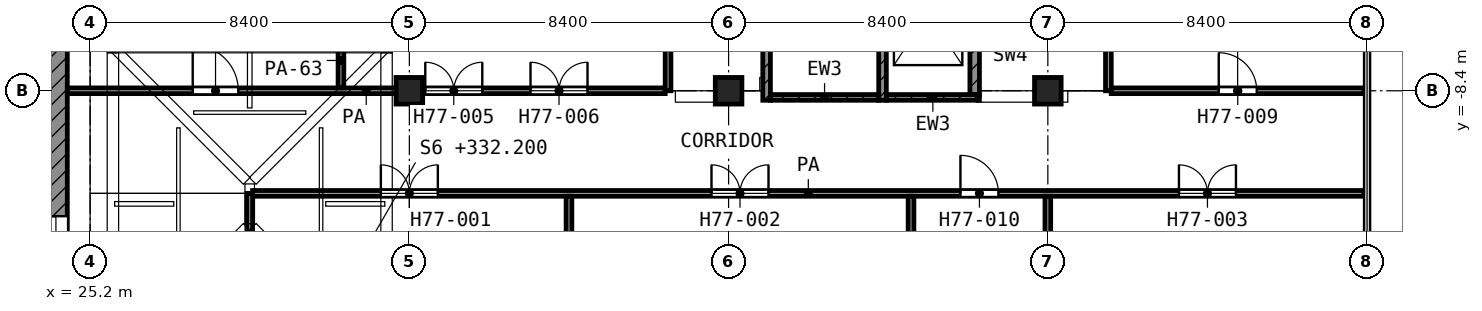
"""IFC4 building model, lengths in metres.
Left out: names, types, materials, properties, quantities, classifications, styles, units other than length and angle.
Written with IfcOpenShell. Run it as: python <this file> out.ifc"""

import sys

from ifc_helpers import new_model, si_unit, direction, frame, frame_2d, origin, origin_2d, place, context, subcontext, project, spatial, rectangle, extrude, element, fill, save


model = new_model("IFC4")
c1 = context("Model", 3, precision=1e-05, world=origin(), true_north=direction((0.0, 1.0)))
c2 = subcontext(c1, "Body", "Model", "MODEL_VIEW")
j1 = project(units=[si_unit("LENGTHUNIT", "METRE"), si_unit("PLANEANGLEUNIT", "RADIAN")], contexts=[c1])
p1 = place(None, origin())
s1 = spatial("IfcSite", under=j1, at=p1, CompositionType="ELEMENT")
p2 = place(p1, origin())
s2 = spatial("IfcBuilding", under=s1, at=p2, CompositionType="ELEMENT")
p3 = place(p2, frame((0.0, 0.0, 332.2)))
s3 = spatial("IfcBuildingStorey", under=s2, at=p3, CompositionType="ELEMENT", Elevation=332.2)
for number, where, z_axis, x_axis in (
    (1, (33.6, -8.4, 0.0), (0.0, 0.0, 1.0), (1.0, 0.0, 0.0)),
    (2, (42.0, -8.4, 0.0), (0.0, 0.0, 1.0), (1.0, 0.0, 0.0)),
    (3, (50.4, -8.4, 0.0), (0.0, 0.0, 1.0), (1.0, 0.0, 0.0)),
):
    element("IfcColumn", number, at=place(p3, frame(where, z_axis=z_axis, x_axis=x_axis)), inside=s3, PredefinedType="COLUMN", context=c2, shape_type="SweptSolid", body=[
        extrude(rectangle(XDim=0.7, YDim=0.7, at=origin_2d()), origin(), (0.0, 0.0, 1.0), 4.5),
    ])
p4 = place(p3, frame((24.3, -24.0, 0.0), z_axis=(0.0, 0.0, 1.0), x_axis=(0.0, 1.0, 0.0)))
e4 = element("IfcWall", 4, at=p4, inside=s3, PredefinedType="SHEAR", context=c2, shape_type="SweptSolid", body=[
    extrude(rectangle(XDim=18.6, YDim=0.6, at=frame_2d((9.3, 0.0))), origin(), (0.0, 0.0, 1.0), 3.95),
])
p5 = place(p4, frame((10.5, 0.0, 0.0)))
e5 = element("IfcOpeningElement", 5, at=p5, cuts=e4, PredefinedType="OPENING", context=c2, shape_type="SweptSolid", body=[
    extrude(rectangle(XDim=1.8, YDim=2.1, at=frame_2d((0.9, 1.05))), frame((0.0, 0.31, 0.0), z_axis=(0.0, -1.0, 0.0), x_axis=(1.0, 0.0, 0.0)), (0.0, 0.0, 1.0), 0.62),
])
p6 = place(p3, frame((43.0, -8.65, 0.0), z_axis=(0.0, 0.0, 1.0), x_axis=(0.0, 1.0, 0.0)))
e6 = element("IfcWall", 6, at=p6, inside=s3, PredefinedType="SHEAR", context=c2, shape_type="SweptSolid", body=[
    extrude(rectangle(XDim=8.35, YDim=0.2, at=frame_2d((4.175, 0.0))), origin(), (0.0, 0.0, 1.0), 3.95),
])
p7 = place(p6, frame((7.0, 0.0, 0.0)))
e7 = element("IfcOpeningElement", 7, at=p7, cuts=e6, PredefinedType="OPENING", context=c2, shape_type="SweptSolid", body=[
    extrude(rectangle(XDim=1.1, YDim=2.1, at=frame_2d((0.55, 1.05))), frame((0.0, 0.11, 0.0), z_axis=(0.0, -1.0, 0.0), x_axis=(1.0, 0.0, 0.0)), (0.0, 0.0, 1.0), 0.22),
])
p8 = place(p3, frame((46.05, -8.65, 0.0), z_axis=(0.0, 0.0, 1.0), x_axis=(0.0, 1.0, 0.0)))
e8 = element("IfcWall", 8, at=p8, inside=s3, PredefinedType="SHEAR", context=c2, shape_type="SweptSolid", body=[
    extrude(rectangle(XDim=8.35, YDim=0.2, at=frame_2d((4.175, 0.0))), origin(), (0.0, 0.0, 1.0), 3.95),
])
p9 = place(p8, frame((7.0, 0.0, 0.0)))
e9 = element("IfcOpeningElement", 9, at=p9, cuts=e8, PredefinedType="OPENING", context=c2, shape_type="SweptSolid", body=[
    extrude(rectangle(XDim=1.1, YDim=2.1, at=frame_2d((0.55, 1.05))), frame((0.0, 0.11, 0.0), z_axis=(0.0, -1.0, 0.0), x_axis=(1.0, 0.0, 0.0)), (0.0, 0.0, 1.0), 0.22),
])
p10 = place(p3, frame((43.1, -8.575, 0.0), z_axis=(0.0, 0.0, 1.0), x_axis=(1.0, 0.0, 0.0)))
e10 = element("IfcWall", 10, at=p10, inside=s3, PredefinedType="SHEAR", context=c2, shape_type="SweptSolid", body=[
    extrude(rectangle(XDim=2.85, YDim=0.15, at=frame_2d((1.425, 0.0))), origin(), (0.0, 0.0, 1.0), 3.95),
])
p11 = place(p3, frame((46.15, -8.575, 0.0), z_axis=(0.0, 0.0, 1.0), x_axis=(1.0, 0.0, 0.0)))
e11 = element("IfcWall", 11, at=p11, inside=s3, PredefinedType="SHEAR", context=c2, shape_type="SweptSolid", body=[
    extrude(rectangle(XDim=2.45, YDim=0.15, at=frame_2d((1.225, 0.0))), origin(), (0.0, 0.0, 1.0), 3.95),
])
p12 = place(p3, frame((48.475, -8.5, 0.0), z_axis=(0.0, 0.0, 1.0), x_axis=(0.0, 1.0, 0.0)))
e12 = element("IfcWall", 12, at=p12, inside=s3, PredefinedType="SHEAR", context=c2, shape_type="SweptSolid", body=[
    extrude(rectangle(XDim=3.475, YDim=0.25, at=frame_2d((1.738, 0.0))), origin(), (0.0, 0.0, 1.0), 3.95),
])
p13 = place(p3, frame((29.475, -11.1, 0.0), z_axis=(0.0, 0.0, 1.0), x_axis=(1.0, 0.0, 0.0)))
e13 = element("IfcWall", 13, at=p13, inside=s3, PredefinedType="PARTITIONING", context=c2, shape_type="SweptSolid", body=[
    extrude(rectangle(XDim=29.245, YDim=0.15, at=frame_2d((14.623, 0.0))), origin(), (0.0, 0.0, 1.0), 3.95),
])
p14 = place(p13, frame((3.375, 0.0, 0.0)))
e14 = element("IfcOpeningElement", 14, at=p14, cuts=e13, PredefinedType="OPENING", context=c2, shape_type="SweptSolid", body=[
    extrude(rectangle(XDim=1.5, YDim=2.1, at=frame_2d((0.75, 1.05))), frame((0.0, 0.085, 0.0), z_axis=(0.0, -1.0, 0.0), x_axis=(1.0, 0.0, 0.0)), (0.0, 0.0, 1.0), 0.17),
])
p15 = place(p13, frame((12.075, 0.0, 0.0)))
e15 = element("IfcOpeningElement", 15, at=p15, cuts=e13, PredefinedType="OPENING", context=c2, shape_type="SweptSolid", body=[
    extrude(rectangle(XDim=1.5, YDim=2.1, at=frame_2d((0.75, 1.05))), frame((0.0, 0.085, 0.0), z_axis=(0.0, -1.0, 0.0), x_axis=(1.0, 0.0, 0.0)), (0.0, 0.0, 1.0), 0.17),
])
p16 = place(p13, frame((18.625, 0.0, 0.0)))
e16 = element("IfcOpeningElement", 16, at=p16, cuts=e13, PredefinedType="OPENING", context=c2, shape_type="SweptSolid", body=[
    extrude(rectangle(XDim=1.0, YDim=2.1, at=frame_2d((0.5, 1.05))), frame((0.0, 0.085, 0.0), z_axis=(0.0, -1.0, 0.0), x_axis=(1.0, 0.0, 0.0)), (0.0, 0.0, 1.0), 0.17),
])
p17 = place(p13, frame((24.375, 0.0, 0.0)))
e17 = element("IfcOpeningElement", 17, at=p17, cuts=e13, PredefinedType="OPENING", context=c2, shape_type="SweptSolid", body=[
    extrude(rectangle(XDim=1.5, YDim=2.1, at=frame_2d((0.75, 1.05))), frame((0.0, 0.085, 0.0), z_axis=(0.0, -1.0, 0.0), x_axis=(1.0, 0.0, 0.0)), (0.0, 0.0, 1.0), 0.17),
])
p18 = place(p3, frame((24.6, -8.4, 0.0), z_axis=(0.0, 0.0, 1.0), x_axis=(1.0, 0.0, 0.0)))
e18 = element("IfcWall", 18, at=p18, inside=s3, PredefinedType="PARTITIONING", context=c2, shape_type="SweptSolid", body=[
    extrude(rectangle(XDim=15.732, YDim=0.15, at=frame_2d((7.866, 0.0))), origin(), (0.0, 0.0, 1.0), 3.95),
])
p19 = place(p18, frame((3.3, 0.0, 0.0)))
e19 = element("IfcOpeningElement", 19, at=p19, cuts=e18, PredefinedType="OPENING", context=c2, shape_type="SweptSolid", body=[
    extrude(rectangle(XDim=1.2, YDim=2.1, at=frame_2d((0.6, 1.05))), frame((0.0, 0.085, 0.0), z_axis=(0.0, -1.0, 0.0), x_axis=(1.0, 0.0, 0.0)), (0.0, 0.0, 1.0), 0.17),
])
p20 = place(p18, frame((9.419, 0.0, 0.0)))
e20 = element("IfcOpeningElement", 20, at=p20, cuts=e18, PredefinedType="OPENING", context=c2, shape_type="SweptSolid", body=[
    extrude(rectangle(XDim=1.5, YDim=2.1, at=frame_2d((0.75, 1.05))), frame((0.0, 0.085, 0.0), z_axis=(0.0, -1.0, 0.0), x_axis=(1.0, 0.0, 0.0)), (0.0, 0.0, 1.0), 0.17),
])
p21 = place(p18, frame((12.188, 0.0, 0.0)))
e21 = element("IfcOpeningElement", 21, at=p21, cuts=e18, PredefinedType="OPENING", context=c2, shape_type="SweptSolid", body=[
    extrude(rectangle(XDim=1.5, YDim=2.1, at=frame_2d((0.75, 1.05))), frame((0.0, 0.085, 0.0), z_axis=(0.0, -1.0, 0.0), x_axis=(1.0, 0.0, 0.0)), (0.0, 0.0, 1.0), 0.17),
])
p22 = place(p3, frame((52.068, -8.4, 0.0), z_axis=(0.0, 0.0, 1.0), x_axis=(1.0, 0.0, 0.0)))
e22 = element("IfcWall", 22, at=p22, inside=s3, PredefinedType="PARTITIONING", context=c2, shape_type="SweptSolid", body=[
    extrude(rectangle(XDim=6.652, YDim=0.15, at=frame_2d((3.326, 0.0))), origin(), (0.0, 0.0, 1.0), 3.95),
])
p23 = place(p22, frame((2.829, 0.0, 0.0)))
e23 = element("IfcOpeningElement", 23, at=p23, cuts=e22, PredefinedType="OPENING", context=c2, shape_type="SweptSolid", body=[
    extrude(rectangle(XDim=1.0, YDim=2.1, at=frame_2d((0.5, 1.05))), frame((0.0, 0.085, 0.0), z_axis=(0.0, -1.0, 0.0), x_axis=(1.0, 0.0, 0.0)), (0.0, 0.0, 1.0), 0.17),
])
p24 = place(p3, frame((29.4, -15.95, 0.0), z_axis=(0.0, 0.0, 1.0), x_axis=(0.0, 1.0, 0.0)))
e24 = element("IfcWall", 24, at=p24, inside=s3, PredefinedType="PARTITIONING", context=c2, shape_type="SweptSolid", body=[
    extrude(rectangle(XDim=4.85, YDim=0.15, at=frame_2d((2.425, 0.0))), origin(), (0.0, 0.0, 1.0), 2.85),
])
p25 = place(p3, frame((31.8, -8.325, 0.0), z_axis=(0.0, 0.0, 1.0), x_axis=(0.0, 1.0, 0.0)))
e25 = element("IfcWall", 25, at=p25, inside=s3, PredefinedType="PARTITIONING", context=c2, shape_type="SweptSolid", body=[
    extrude(rectangle(XDim=1.445, YDim=0.15, at=frame_2d((0.723, 0.0))), origin(), (0.0, 0.0, 1.0), 2.85),
])
p26 = place(p3, frame((37.8, -25.12, 0.0), z_axis=(0.0, 0.0, 1.0), x_axis=(0.0, 1.0, 0.0)))
e26 = element("IfcWall", 26, at=p26, inside=s3, PredefinedType="PARTITIONING", context=c2, shape_type="SweptSolid", body=[
    extrude(rectangle(XDim=13.945, YDim=0.15, at=frame_2d((6.973, 0.0))), origin(), (0.0, 0.0, 1.0), 3.95),
])
p27 = place(p3, frame((40.407, -8.4, 0.0), z_axis=(0.0, 0.0, 1.0), x_axis=(0.0, 1.0, 0.0)))
e27 = element("IfcWall", 27, at=p27, inside=s3, PredefinedType="PARTITIONING", context=c2, shape_type="SweptSolid", body=[
    extrude(rectangle(XDim=8.32, YDim=0.15, at=frame_2d((4.16, 0.0))), origin(), (0.0, 0.0, 1.0), 3.95),
])
for number, where, z_axis, x_axis in (
    (28, (46.8, -25.12, 0.0), (0.0, 0.0, 1.0), (0.0, 1.0, 0.0)),
    (29, (50.4, -25.12, 0.0), (0.0, 0.0, 1.0), (0.0, 1.0, 0.0)),
):
    element("IfcWall", number, at=place(p3, frame(where, z_axis=z_axis, x_axis=x_axis)), inside=s3, PredefinedType="PARTITIONING", context=c2, shape_type="SweptSolid", body=[
        extrude(rectangle(XDim=13.945, YDim=0.15, at=frame_2d((6.973, 0.0))), origin(), (0.0, 0.0, 1.0), 3.95),
    ])
p28 = place(p3, frame((51.993, -8.4, 0.0), z_axis=(0.0, 0.0, 1.0), x_axis=(0.0, 1.0, 0.0)))
e30 = element("IfcWall", 30, at=p28, inside=s3, PredefinedType="PARTITIONING", context=c2, shape_type="SweptSolid", body=[
    extrude(rectangle(XDim=6.548, YDim=0.15, at=frame_2d((3.274, 0.0))), origin(), (0.0, 0.0, 1.0), 3.95),
])
p29 = place(p5, origin())
e31 = element("IfcDoor", 31, at=p29, inside=s3, OperationType="DOUBLE_DOOR_SINGLE_SWING", PredefinedType="DOOR", context=c2, shape_type="SweptSolid", body=[
    extrude(rectangle(XDim=1.8, YDim=2.1, at=frame_2d((0.9, 1.05))), frame((0.0, 0.025, 0.0), z_axis=(0.0, -1.0, 0.0), x_axis=(1.0, 0.0, 0.0)), (0.0, 0.0, 1.0), 0.05),
])
fill(e5, e31)
p30 = place(p19, origin())
e32 = element("IfcDoor", 32, at=p30, inside=s3, OperationType="SINGLE_SWING_LEFT", PredefinedType="DOOR", context=c2, shape_type="SweptSolid", body=[
    extrude(rectangle(XDim=1.2, YDim=2.1, at=frame_2d((0.6, 1.05))), frame((0.0, 0.025, 0.0), z_axis=(0.0, -1.0, 0.0), x_axis=(1.0, 0.0, 0.0)), (0.0, 0.0, 1.0), 0.05),
])
fill(e19, e32)
p31 = place(p23, origin())
e33 = element("IfcDoor", 33, at=p31, inside=s3, OperationType="SINGLE_SWING_LEFT", PredefinedType="DOOR", context=c2, shape_type="SweptSolid", body=[
    extrude(rectangle(XDim=1.0, YDim=2.1, at=frame_2d((0.5, 1.05))), frame((0.0, 0.025, 0.0), z_axis=(0.0, -1.0, 0.0), x_axis=(1.0, 0.0, 0.0)), (0.0, 0.0, 1.0), 0.05),
])
fill(e23, e33)
p32 = place(p14, origin())
e34 = element("IfcDoor", 34, at=p32, inside=s3, OperationType="DOUBLE_DOOR_SINGLE_SWING", PredefinedType="DOOR", context=c2, shape_type="SweptSolid", body=[
    extrude(rectangle(XDim=1.5, YDim=2.1, at=frame_2d((0.75, 1.05))), frame((0.0, 0.025, 0.0), z_axis=(0.0, -1.0, 0.0), x_axis=(1.0, 0.0, 0.0)), (0.0, 0.0, 1.0), 0.05),
])
fill(e14, e34)
p33 = place(p15, origin())
e35 = element("IfcDoor", 35, at=p33, inside=s3, OperationType="DOUBLE_DOOR_SINGLE_SWING", PredefinedType="DOOR", context=c2, shape_type="SweptSolid", body=[
    extrude(rectangle(XDim=1.5, YDim=2.1, at=frame_2d((0.75, 1.05))), frame((0.0, 0.025, 0.0), z_axis=(0.0, -1.0, 0.0), x_axis=(1.0, 0.0, 0.0)), (0.0, 0.0, 1.0), 0.05),
])
fill(e15, e35)
p34 = place(p16, origin())
e36 = element("IfcDoor", 36, at=p34, inside=s3, OperationType="SINGLE_SWING_LEFT", PredefinedType="DOOR", context=c2, shape_type="SweptSolid", body=[
    extrude(rectangle(XDim=1.0, YDim=2.1, at=frame_2d((0.5, 1.05))), frame((0.0, 0.025, 0.0), z_axis=(0.0, -1.0, 0.0), x_axis=(1.0, 0.0, 0.0)), (0.0, 0.0, 1.0), 0.05),
])
fill(e16, e36)
p35 = place(p17, origin())
e37 = element("IfcDoor", 37, at=p35, inside=s3, OperationType="DOUBLE_DOOR_SINGLE_SWING", PredefinedType="DOOR", context=c2, shape_type="SweptSolid", body=[
    extrude(rectangle(XDim=1.5, YDim=2.1, at=frame_2d((0.75, 1.05))), frame((0.0, 0.025, 0.0), z_axis=(0.0, -1.0, 0.0), x_axis=(1.0, 0.0, 0.0)), (0.0, 0.0, 1.0), 0.05),
])
fill(e17, e37)
p36 = place(p20, origin())
e38 = element("IfcDoor", 38, at=p36, inside=s3, OperationType="DOUBLE_DOOR_SINGLE_SWING", PredefinedType="DOOR", context=c2, shape_type="SweptSolid", body=[
    extrude(rectangle(XDim=1.5, YDim=2.1, at=frame_2d((0.75, 1.05))), frame((0.0, 0.025, 0.0), z_axis=(0.0, -1.0, 0.0), x_axis=(1.0, 0.0, 0.0)), (0.0, 0.0, 1.0), 0.05),
])
fill(e20, e38)
p37 = place(p21, origin())
e39 = element("IfcDoor", 39, at=p37, inside=s3, OperationType="DOUBLE_DOOR_SINGLE_SWING", PredefinedType="DOOR", context=c2, shape_type="SweptSolid", body=[
    extrude(rectangle(XDim=1.5, YDim=2.1, at=frame_2d((0.75, 1.05))), frame((0.0, 0.025, 0.0), z_axis=(0.0, -1.0, 0.0), x_axis=(1.0, 0.0, 0.0)), (0.0, 0.0, 1.0), 0.05),
])
fill(e21, e39)
save(model, sys.argv[1])
